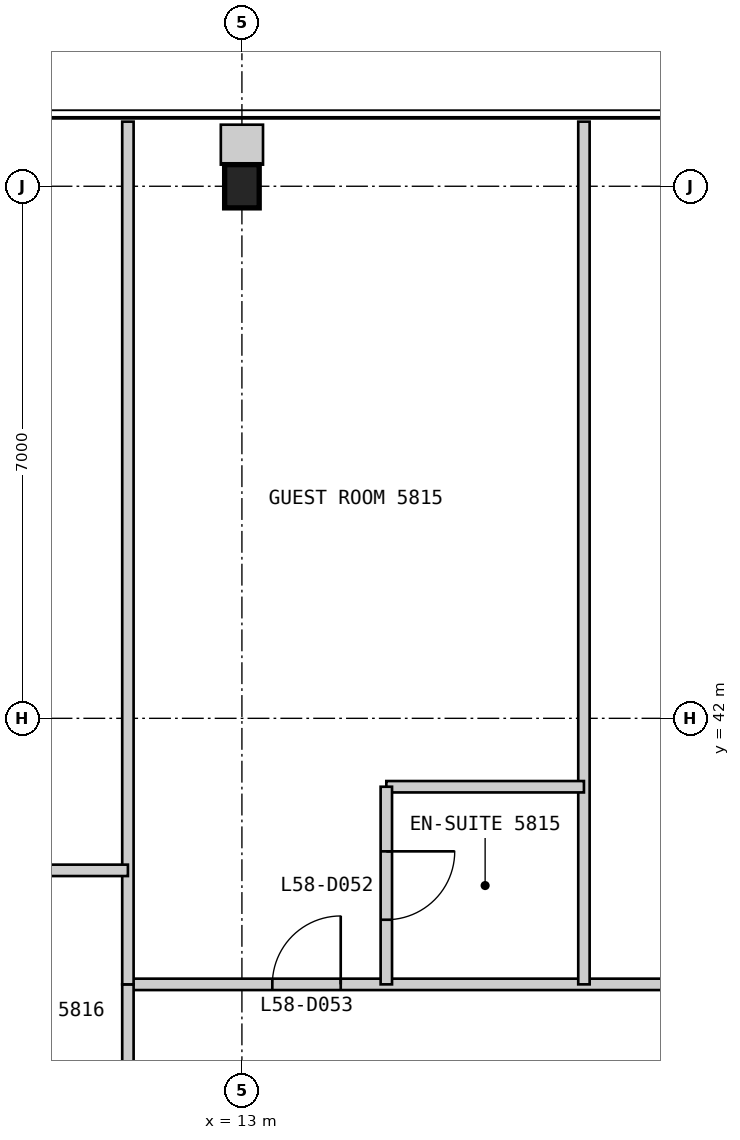
"""IFC4 building model, lengths in metres.
Left out: names, types, materials, properties, quantities, classifications, styles, units other than length and angle.
Written with IfcOpenShell. Run it as: python <this file> out.ifc"""

import sys

from ifc_helpers import new_model, si_unit, direction, frame, frame_2d, origin, origin_2d, place, context, subcontext, project, spatial, rectangle, i_section, extrude, element, fill, save


model = new_model("IFC4")
c1 = context("Model", 3, precision=1e-05, world=origin(), true_north=direction((0.0, 1.0)))
c2 = subcontext(c1, "Body", "Model", "MODEL_VIEW")
j1 = project(units=[si_unit("LENGTHUNIT", "METRE"), si_unit("PLANEANGLEUNIT", "RADIAN")], contexts=[c1])
p1 = place(None, origin())
s1 = spatial("IfcSite", under=j1, at=p1, CompositionType="ELEMENT")
p2 = place(p1, origin())
s2 = spatial("IfcBuilding", under=s1, at=p2, CompositionType="ELEMENT")
p3 = place(p2, frame((0.0, 0.0, 249.2)))
s3 = spatial("IfcBuildingStorey", under=s2, at=p3, CompositionType="ELEMENT", Elevation=249.2)
p4 = place(p3, frame((13.0, 49.0, 0.0), z_axis=(0.0, 0.0, 1.0), x_axis=(1.0, 0.0, 0.0)))
e1 = element("IfcColumn", 1, at=p4, inside=s3, PredefinedType="COLUMN", context=c2, shape_type="SweptSolid", body=[
    extrude(i_section(OverallWidth=0.455, OverallDepth=0.569, WebThickness=0.078, FlangeThickness=0.125, at=origin_2d()), origin(), (0.0, 0.0, 1.0), 3.4),
])
p5 = place(p3, frame((38.5, 38.5, 0.0), z_axis=(0.0, 0.0, 1.0), x_axis=(-1.0, 0.0, 0.0)))
e2 = element("IfcWall", 2, at=p5, inside=s3, PredefinedType="PARTITIONING", context=c2, shape_type="SweptSolid", body=[
    extrude(rectangle(XDim=27.0, YDim=0.15, at=frame_2d((13.5, 0.0))), origin(), (0.0, 0.0, 1.0), 3.25),
])
p6 = place(p5, frame((1.85, 0.0, 0.0)))
e3 = element("IfcOpeningElement", 3, at=p6, cuts=e2, PredefinedType="OPENING", context=c2, shape_type="SweptSolid", body=[
    extrude(rectangle(XDim=0.9, YDim=2.1, at=frame_2d((0.45, 1.05))), frame((0.0, 0.085, 0.0), z_axis=(0.0, -1.0, 0.0), x_axis=(1.0, 0.0, 0.0)), (0.0, 0.0, 1.0), 0.17),
])
p7 = place(p5, frame((6.2, 0.0, 0.0)))
e4 = element("IfcOpeningElement", 4, at=p7, cuts=e2, PredefinedType="OPENING", context=c2, shape_type="SweptSolid", body=[
    extrude(rectangle(XDim=0.9, YDim=2.1, at=frame_2d((0.45, 1.05))), frame((0.0, 0.085, 0.0), z_axis=(0.0, -1.0, 0.0), x_axis=(1.0, 0.0, 0.0)), (0.0, 0.0, 1.0), 0.17),
])
p8 = place(p5, frame((12.8, 0.0, 0.0)))
e5 = element("IfcOpeningElement", 5, at=p8, cuts=e2, PredefinedType="OPENING", context=c2, shape_type="SweptSolid", body=[
    extrude(rectangle(XDim=1.0, YDim=2.1, at=frame_2d((0.5, 1.05))), frame((0.0, 0.085, 0.0), z_axis=(0.0, -1.0, 0.0), x_axis=(1.0, 0.0, 0.0)), (0.0, 0.0, 1.0), 0.17),
])
p9 = place(p5, frame((18.2, 0.0, 0.0)))
e6 = element("IfcOpeningElement", 6, at=p9, cuts=e2, PredefinedType="OPENING", context=c2, shape_type="SweptSolid", body=[
    extrude(rectangle(XDim=0.9, YDim=2.1, at=frame_2d((0.45, 1.05))), frame((0.0, 0.085, 0.0), z_axis=(0.0, -1.0, 0.0), x_axis=(1.0, 0.0, 0.0)), (0.0, 0.0, 1.0), 0.17),
])
p10 = place(p5, frame((24.2, 0.0, 0.0)))
e7 = element("IfcOpeningElement", 7, at=p10, cuts=e2, PredefinedType="OPENING", context=c2, shape_type="SweptSolid", body=[
    extrude(rectangle(XDim=0.9, YDim=2.1, at=frame_2d((0.45, 1.05))), frame((0.0, 0.085, 0.0), z_axis=(0.0, -1.0, 0.0), x_axis=(1.0, 0.0, 0.0)), (0.0, 0.0, 1.0), 0.17),
])
p11 = place(p3, frame((17.5, 49.85, 0.0), z_axis=(0.0, 0.0, 1.0), x_axis=(0.0, -1.0, 0.0)))
e8 = element("IfcWall", 8, at=p11, inside=s3, PredefinedType="PARTITIONING", context=c2, shape_type="SweptSolid", body=[
    extrude(rectangle(XDim=11.35, YDim=0.15, at=frame_2d((5.675, 0.0))), origin(), (0.0, 0.0, 1.0), 3.25),
])
p12 = place(p3, frame((17.5, 41.1, 0.0), z_axis=(0.0, 0.0, 1.0), x_axis=(-1.0, 0.0, 0.0)))
e9 = element("IfcWall", 9, at=p12, inside=s3, PredefinedType="PARTITIONING", context=c2, shape_type="SweptSolid", body=[
    extrude(rectangle(XDim=2.6, YDim=0.15, at=frame_2d((1.3, 0.0))), origin(), (0.0, 0.0, 1.0), 3.25),
])
p13 = place(p3, frame((14.9, 41.1, 0.0), z_axis=(0.0, 0.0, 1.0), x_axis=(0.0, -1.0, 0.0)))
e10 = element("IfcWall", 10, at=p13, inside=s3, PredefinedType="PARTITIONING", context=c2, shape_type="SweptSolid", body=[
    extrude(rectangle(XDim=2.6, YDim=0.15, at=frame_2d((1.3, 0.0))), origin(), (0.0, 0.0, 1.0), 3.25),
])
p14 = place(p13, frame((0.85, 0.0, 0.0)))
e11 = element("IfcOpeningElement", 11, at=p14, cuts=e10, PredefinedType="OPENING", context=c2, shape_type="SweptSolid", body=[
    extrude(rectangle(XDim=0.9, YDim=2.1, at=frame_2d((0.45, 1.05))), frame((0.0, 0.085, 0.0), z_axis=(0.0, -1.0, 0.0), x_axis=(1.0, 0.0, 0.0)), (0.0, 0.0, 1.0), 0.17),
])
p15 = place(p3, frame((11.5, 38.5, 0.0), z_axis=(0.0, 0.0, 1.0), x_axis=(0.0, -1.0, 0.0)))
e12 = element("IfcWall", 12, at=p15, inside=s3, PredefinedType="PARTITIONING", context=c2, shape_type="SweptSolid", body=[
    extrude(rectangle(XDim=27.0, YDim=0.15, at=frame_2d((13.5, 0.0))), origin(), (0.0, 0.0, 1.0), 3.25),
])
p16 = place(p15, frame((1.85, 0.0, 0.0)))
e13 = element("IfcOpeningElement", 13, at=p16, cuts=e12, PredefinedType="OPENING", context=c2, shape_type="SweptSolid", body=[
    extrude(rectangle(XDim=0.9, YDim=2.1, at=frame_2d((0.45, 1.05))), frame((0.0, 0.085, 0.0), z_axis=(0.0, -1.0, 0.0), x_axis=(1.0, 0.0, 0.0)), (0.0, 0.0, 1.0), 0.17),
])
p17 = place(p15, frame((6.2, 0.0, 0.0)))
e14 = element("IfcOpeningElement", 14, at=p17, cuts=e12, PredefinedType="OPENING", context=c2, shape_type="SweptSolid", body=[
    extrude(rectangle(XDim=0.9, YDim=2.1, at=frame_2d((0.45, 1.05))), frame((0.0, 0.085, 0.0), z_axis=(0.0, -1.0, 0.0), x_axis=(1.0, 0.0, 0.0)), (0.0, 0.0, 1.0), 0.17),
])
p18 = place(p15, frame((12.2, 0.0, 0.0)))
e15 = element("IfcOpeningElement", 15, at=p18, cuts=e12, PredefinedType="OPENING", context=c2, shape_type="SweptSolid", body=[
    extrude(rectangle(XDim=0.9, YDim=2.1, at=frame_2d((0.45, 1.05))), frame((0.0, 0.085, 0.0), z_axis=(0.0, -1.0, 0.0), x_axis=(1.0, 0.0, 0.0)), (0.0, 0.0, 1.0), 0.17),
])
p19 = place(p15, frame((18.2, 0.0, 0.0)))
e16 = element("IfcOpeningElement", 16, at=p19, cuts=e12, PredefinedType="OPENING", context=c2, shape_type="SweptSolid", body=[
    extrude(rectangle(XDim=0.9, YDim=2.1, at=frame_2d((0.45, 1.05))), frame((0.0, 0.085, 0.0), z_axis=(0.0, -1.0, 0.0), x_axis=(1.0, 0.0, 0.0)), (0.0, 0.0, 1.0), 0.17),
])
p20 = place(p15, frame((24.2, 0.0, 0.0)))
e17 = element("IfcOpeningElement", 17, at=p20, cuts=e12, PredefinedType="OPENING", context=c2, shape_type="SweptSolid", body=[
    extrude(rectangle(XDim=0.9, YDim=2.1, at=frame_2d((0.45, 1.05))), frame((0.0, 0.085, 0.0), z_axis=(0.0, -1.0, 0.0), x_axis=(1.0, 0.0, 0.0)), (0.0, 0.0, 1.0), 0.17),
])
p21 = place(p3, frame((11.5, 49.85, 0.0), z_axis=(0.0, 0.0, 1.0), x_axis=(0.0, -1.0, 0.0)))
e18 = element("IfcWall", 18, at=p21, inside=s3, PredefinedType="PARTITIONING", context=c2, shape_type="SweptSolid", body=[
    extrude(rectangle(XDim=11.35, YDim=0.15, at=frame_2d((5.675, 0.0))), origin(), (0.0, 0.0, 1.0), 3.25),
])
p22 = place(p3, frame((8.9, 40.0, 0.0), z_axis=(0.0, 0.0, 1.0), x_axis=(1.0, 0.0, 0.0)))
e19 = element("IfcWall", 19, at=p22, inside=s3, PredefinedType="PARTITIONING", context=c2, shape_type="SweptSolid", body=[
    extrude(rectangle(XDim=2.6, YDim=0.15, at=frame_2d((1.3, 0.0))), origin(), (0.0, 0.0, 1.0), 3.25),
])
p23 = place(p3, frame((13.0, 49.81, 0.0), z_axis=(0.0, 0.0, 1.0), x_axis=(0.0, -1.0, 0.0)))
e20 = element("IfcWall", 20, at=p23, inside=s3, PredefinedType="PARTITIONING", context=c2, shape_type="SweptSolid", body=[
    extrude(rectangle(XDim=0.526, YDim=0.555, at=frame_2d((0.263, 0.0))), origin(), (0.0, 0.0, 1.0), 3.25),
])
p24 = place(p14, origin())
e21 = element("IfcDoor", 21, at=p24, inside=s3, OperationType="SINGLE_SWING_LEFT", PredefinedType="DOOR", context=c2, shape_type="SweptSolid", body=[
    extrude(rectangle(XDim=0.9, YDim=2.1, at=frame_2d((0.45, 1.05))), frame((0.0, 0.025, 0.0), z_axis=(0.0, -1.0, 0.0), x_axis=(1.0, 0.0, 0.0)), (0.0, 0.0, 1.0), 0.05),
])
fill(e11, e21)
p25 = place(p10, frame((0.9, 0.0, 0.0), z_axis=(0.0, 0.0, 1.0), x_axis=(-1.0, 0.0, 0.0)))
e22 = element("IfcDoor", 22, at=p25, inside=s3, OperationType="SINGLE_SWING_RIGHT", PredefinedType="DOOR", context=c2, shape_type="SweptSolid", body=[
    extrude(rectangle(XDim=0.9, YDim=2.1, at=frame_2d((0.45, 1.05))), frame((0.0, 0.025, 0.0), z_axis=(0.0, -1.0, 0.0), x_axis=(1.0, 0.0, 0.0)), (0.0, 0.0, 1.0), 0.05),
])
fill(e7, e22)
save(model, sys.argv[1])
